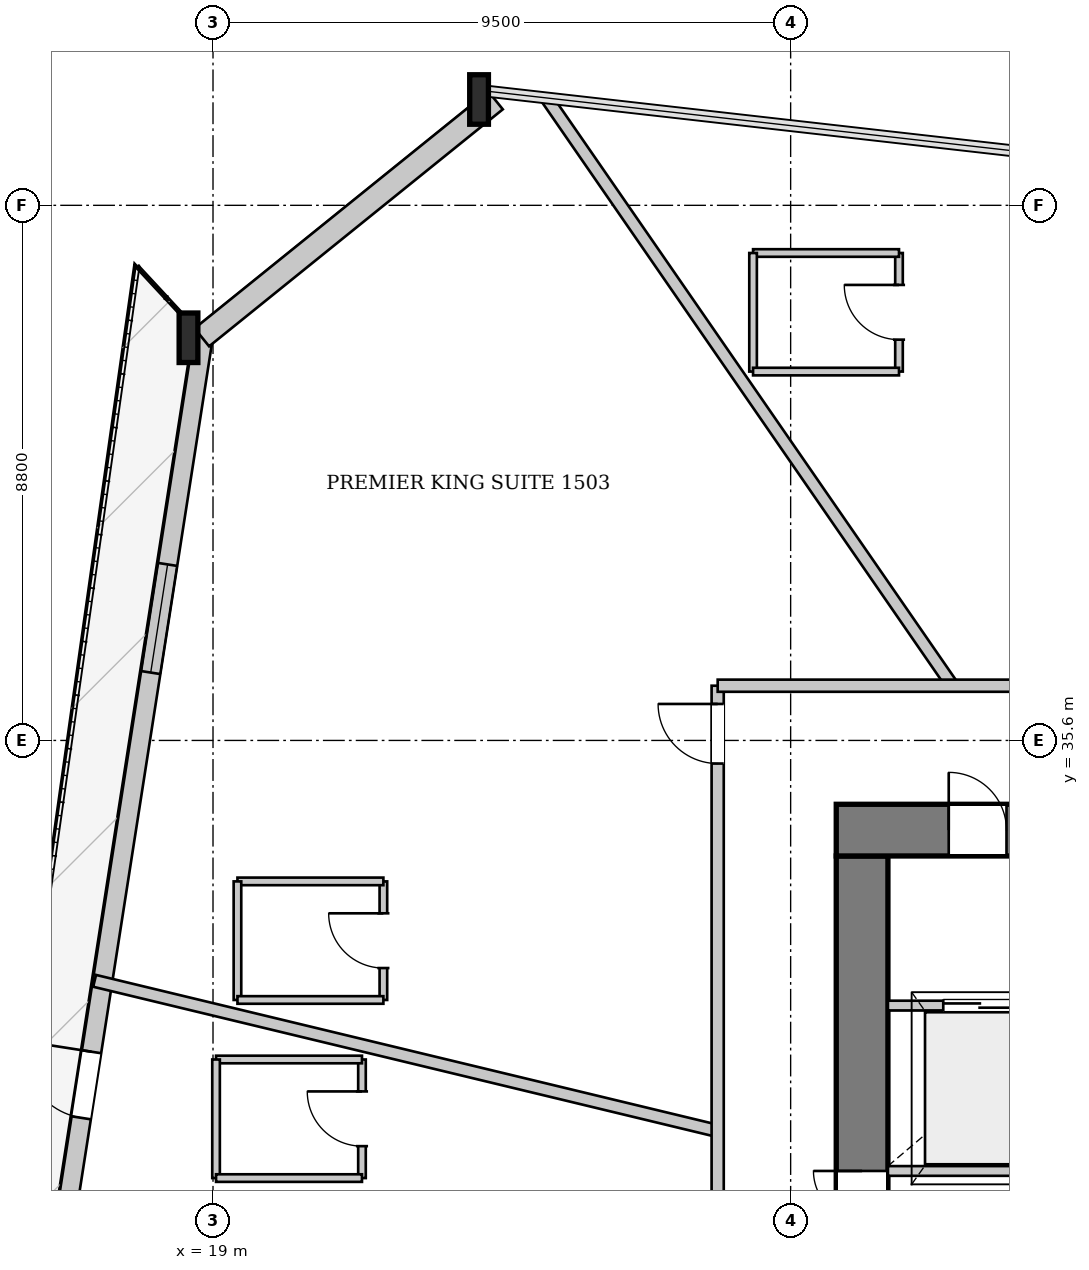
"""IFC4 building model, lengths in metres.
Left out: names, types, materials, properties, quantities, classifications, styles, units other than length and angle.
Written with IfcOpenShell. Run it as: python <this file> out.ifc"""

import sys

from ifc_helpers import new_model, si_unit, direction, frame, frame_2d, origin, origin_2d, place, context, subcontext, project, spatial, rectangle, i_section, extrude, source, transform, mapped, element, fill, save


model = new_model("IFC4")
c1 = context("Model", 3, precision=1e-05, world=origin(), true_north=direction((0.0, 1.0)))
c2 = subcontext(c1, "Body", "Model", "MODEL_VIEW")
j1 = project(units=[si_unit("LENGTHUNIT", "METRE"), si_unit("PLANEANGLEUNIT", "RADIAN")], contexts=[c1])
p1 = place(None, origin())
s1 = spatial("IfcSite", under=j1, at=p1, CompositionType="ELEMENT")
p2 = place(p1, origin())
s2 = spatial("IfcBuilding", under=s1, at=p2, CompositionType="ELEMENT")
p3 = place(p2, frame((0.0, 0.0, 61.25)))
s3 = spatial("IfcBuildingStorey", under=s2, at=p3, CompositionType="ELEMENT", Elevation=61.25)
m1 = source(origin(), c2, "Body", "SweptSolid", [
    extrude(i_section(OverallWidth=0.308, OverallDepth=0.814, WebThickness=0.021, FlangeThickness=0.04, at=origin_2d()), origin(), (0.0, 0.0, 1.0), 3.409),
])
p4 = place(p3, frame((23.527, 46.274, 0.0), z_axis=(-0.088944570663, -0.078632156673, 0.99292791646), x_axis=(0.662339568737, -0.749203774473, 0.0)))
e1 = element("IfcColumn", 1, at=p4, inside=s3, PredefinedType="COLUMN", context=c2, shape_type="MappedRepresentation", body=[
    mapped(m1, transform((0.0, 0.0, 0.0), x_axis=(1.0, 0.0, 0.0), y_axis=(0.0, 1.0, 0.0), z_axis=(0.0, 0.0, 1.0), scale=1.0)),
])
m2 = source(origin(), c2, "Body", "SweptSolid", [
    extrude(i_section(OverallWidth=0.308, OverallDepth=0.814, WebThickness=0.021, FlangeThickness=0.04, at=origin_2d()), origin(), (0.0, 0.0, 1.0), 3.405),
])
p5 = place(p3, frame((18.697, 42.377, 0.0), z_axis=(-0.058937346962, -0.090843818249, 0.994119605389), x_axis=(0.838912262551, -0.544266677045, 0.0)))
e2 = element("IfcColumn", 2, at=p5, inside=s3, PredefinedType="COLUMN", context=c2, shape_type="MappedRepresentation", body=[
    mapped(m2, transform((0.0, 0.0, 0.0), x_axis=(1.0, 0.0, 0.0), y_axis=(0.0, 1.0, 0.0), z_axis=(0.0, 0.0, 1.0), scale=1.0)),
])
p6 = place(p3, frame((16.006, 24.095, 0.0), z_axis=(0.0, 0.0, 1.0), x_axis=(0.154230167558, 0.988034946454, 0.0)))
e3 = element("IfcWall", 3, at=p6, inside=s3, PredefinedType="SOLIDWALL", context=c2, shape_type="SweptSolid", body=[
    extrude(rectangle(XDim=18.478, YDim=0.32, at=frame_2d((9.239, 0.0))), origin(), (0.0, 0.0, 1.0), 2.592),
])
p7 = place(p6, frame((5.363, 0.0, 0.0)))
e4 = element("IfcOpeningElement", 4, at=p7, cuts=e3, PredefinedType="OPENING", context=c2, shape_type="SweptSolid", body=[
    extrude(rectangle(XDim=1.1, YDim=2.3, at=frame_2d((0.55, 1.15))), frame((0.0, 0.17, 0.0), z_axis=(0.0, -1.0, 0.0), x_axis=(1.0, 0.0, 0.0)), (0.0, 0.0, 1.0), 0.34),
])
p8 = place(p6, frame((12.774, 0.0, 0.272)))
e5 = element("IfcOpeningElement", 5, at=p8, cuts=e3, PredefinedType="OPENING", context=c2, shape_type="SweptSolid", body=[
    extrude(rectangle(XDim=1.8, YDim=2.2, at=frame_2d((0.9, 1.1))), frame((0.0, 0.17, 0.0), z_axis=(0.0, -1.0, 0.0), x_axis=(1.0, 0.0, 0.0)), (0.0, 0.0, 1.0), 0.34),
])
p9 = place(p3, frame((18.817, 42.229, 0.0), z_axis=(0.0, 0.0, 1.0), x_axis=(0.778217687349, 0.627994610722, 0.0)))
e6 = element("IfcWall", 6, at=p9, inside=s3, PredefinedType="SOLIDWALL", context=c2, shape_type="SweptSolid", body=[
    extrude(rectangle(XDim=6.207, YDim=0.38, at=frame_2d((3.103, 0.0))), origin(), (0.0, 0.0, 1.0), 2.592),
])
p10 = place(p3, frame((29.675, 19.5, 0.0), z_axis=(0.0, 0.0, 1.0), x_axis=(0.0, 1.0, 0.0)))
e7 = element("IfcWall", 7, at=p10, inside=s3, PredefinedType="SHEAR", context=c2, shape_type="SweptSolid", body=[
    extrude(rectangle(XDim=14.2, YDim=0.85, at=frame_2d((7.1, 0.0))), origin(), (0.0, 0.0, 1.0), 3.3),
])
p11 = place(p10, frame((7.42, 0.0, 0.0)))
e8 = element("IfcOpeningElement", 8, at=p11, cuts=e7, PredefinedType="OPENING", context=c2, shape_type="SweptSolid", body=[
    extrude(rectangle(XDim=1.6, YDim=2.2, at=frame_2d((0.8, 1.1))), frame((0.0, 0.435, 0.0), z_axis=(0.0, -1.0, 0.0), x_axis=(1.0, 0.0, 0.0)), (0.0, 0.0, 1.0), 0.87),
])
p12 = place(p3, frame((29.25, 34.125, 0.0), z_axis=(0.0, 0.0, 1.0), x_axis=(1.0, 0.0, 0.0)))
e9 = element("IfcWall", 9, at=p12, inside=s3, PredefinedType="SHEAR", context=c2, shape_type="SweptSolid", body=[
    extrude(rectangle(XDim=17.5, YDim=0.85, at=frame_2d((8.75, 0.0))), origin(), (0.0, 0.0, 1.0), 3.3),
])
p13 = place(p12, frame((1.85, 0.0, 0.0)))
e10 = element("IfcOpeningElement", 10, at=p13, cuts=e9, PredefinedType="OPENING", context=c2, shape_type="SweptSolid", body=[
    extrude(rectangle(XDim=0.95, YDim=2.1, at=frame_2d((0.475, 1.05))), frame((0.0, 0.435, 0.0), z_axis=(0.0, -1.0, 0.0), x_axis=(1.0, 0.0, 0.0)), (0.0, 0.0, 1.0), 0.87),
])
p14 = place(p12, frame((4.23, 0.0, 0.0)))
e11 = element("IfcOpeningElement", 11, at=p14, cuts=e9, PredefinedType="OPENING", context=c2, shape_type="SweptSolid", body=[
    extrude(rectangle(XDim=1.32, YDim=2.2, at=frame_2d((0.66, 1.1))), frame((0.0, 0.435, 0.0), z_axis=(0.0, -1.0, 0.0), x_axis=(1.0, 0.0, 0.0)), (0.0, 0.0, 1.0), 0.87),
])
p15 = place(p12, frame((15.3, 0.0, 0.0)))
e12 = element("IfcOpeningElement", 12, at=p15, cuts=e9, PredefinedType="OPENING", context=c2, shape_type="SweptSolid", body=[
    extrude(rectangle(XDim=0.95, YDim=2.1, at=frame_2d((0.475, 1.05))), frame((0.0, 0.435, 0.0), z_axis=(0.0, -1.0, 0.0), x_axis=(1.0, 0.0, 0.0)), (0.0, 0.0, 1.0), 0.87),
])
p16 = place(p3, frame((30.1, 28.52, 0.0), z_axis=(0.0, 0.0, 1.0), x_axis=(1.0, 0.0, 0.0)))
e13 = element("IfcWall", 13, at=p16, inside=s3, PredefinedType="PARTITIONING", context=c2, shape_type="SweptSolid", body=[
    extrude(rectangle(XDim=3.02, YDim=0.16, at=frame_2d((1.51, 0.0))), origin(), (0.0, 0.0, 1.0), 3.3),
])
p17 = place(p3, frame((30.1, 31.24, 0.0), z_axis=(0.0, 0.0, 1.0), x_axis=(1.0, 0.0, 0.0)))
e14 = element("IfcWall", 14, at=p17, inside=s3, PredefinedType="PARTITIONING", context=c2, shape_type="SweptSolid", body=[
    extrude(rectangle(XDim=3.02, YDim=0.16, at=frame_2d((1.51, 0.0))), origin(), (0.0, 0.0, 1.0), 3.3),
])
p18 = place(p17, frame((0.91, 0.0, 0.0)))
e15 = element("IfcOpeningElement", 15, at=p18, cuts=e14, PredefinedType="OPENING", context=c2, shape_type="SweptSolid", body=[
    extrude(rectangle(XDim=1.2, YDim=2.2, at=frame_2d((0.6, 1.1))), frame((0.0, 0.09, 0.0), z_axis=(0.0, -1.0, 0.0), x_axis=(1.0, 0.0, 0.0)), (0.0, 0.0, 1.0), 0.18),
])
p19 = place(p3, frame((31.161, 36.5, 0.0), z_axis=(0.0, 0.0, 1.0), x_axis=(-0.568362835672, 0.822778030229, 0.0)))
e16 = element("IfcWall", 16, at=p19, inside=s3, PredefinedType="PARTITIONING", context=c2, shape_type="SweptSolid", body=[
    extrude(rectangle(XDim=11.708, YDim=0.2, at=frame_2d((5.854, 0.0))), origin(), (0.0, 0.0, 1.0), 3.3),
])
p20 = place(p3, frame((27.3, 29.178, 0.0), z_axis=(0.0, 0.0, 1.0), x_axis=(-0.972184679764, 0.234215602453, 0.0)))
e17 = element("IfcWall", 17, at=p20, inside=s3, PredefinedType="PARTITIONING", context=c2, shape_type="SweptSolid", body=[
    extrude(rectangle(XDim=10.541, YDim=0.2, at=frame_2d((5.27, 0.0))), origin(), (0.0, 0.0, 1.0), 3.3),
])
p21 = place(p3, frame((30.282, 41.666, 0.0), z_axis=(0.0, 0.0, 1.0), x_axis=(0.0, 1.0, 0.0)))
e18 = element("IfcWall", 18, at=p21, inside=s3, PredefinedType="PARTITIONING", context=c2, shape_type="SweptSolid", body=[
    extrude(rectangle(XDim=1.95, YDim=0.125, at=frame_2d((0.975, 0.0))), origin(), (0.0, 0.0, 1.0), 3.3),
])
p22 = place(p21, frame((0.525, 0.0, 0.0)))
e19 = element("IfcOpeningElement", 19, at=p22, cuts=e18, PredefinedType="OPENING", context=c2, shape_type="SweptSolid", body=[
    extrude(rectangle(XDim=0.9, YDim=2.1, at=frame_2d((0.45, 1.05))), frame((0.0, 0.073, 0.0), z_axis=(0.0, -1.0, 0.0), x_axis=(1.0, 0.0, 0.0)), (0.0, 0.0, 1.0), 0.145),
])
p23 = place(p3, frame((30.282, 43.616, 0.0), z_axis=(0.0, 0.0, 1.0), x_axis=(-1.0, 0.0, 0.0)))
e20 = element("IfcWall", 20, at=p23, inside=s3, PredefinedType="PARTITIONING", context=c2, shape_type="SweptSolid", body=[
    extrude(rectangle(XDim=2.4, YDim=0.125, at=frame_2d((1.2, 0.0))), origin(), (0.0, 0.0, 1.0), 3.3),
])
p24 = place(p3, frame((27.882, 43.616, 0.0), z_axis=(0.0, 0.0, 1.0), x_axis=(0.0, -1.0, 0.0)))
e21 = element("IfcWall", 21, at=p24, inside=s3, PredefinedType="PARTITIONING", context=c2, shape_type="SweptSolid", body=[
    extrude(rectangle(XDim=1.95, YDim=0.125, at=frame_2d((0.975, 0.0))), origin(), (0.0, 0.0, 1.0), 3.3),
])
p25 = place(p3, frame((27.882, 41.666, 0.0), z_axis=(0.0, 0.0, 1.0), x_axis=(1.0, 0.0, 0.0)))
e22 = element("IfcWall", 22, at=p25, inside=s3, PredefinedType="PARTITIONING", context=c2, shape_type="SweptSolid", body=[
    extrude(rectangle(XDim=2.4, YDim=0.125, at=frame_2d((1.2, 0.0))), origin(), (0.0, 0.0, 1.0), 3.3),
])
p26 = place(p3, frame((21.802, 31.332, 0.0), z_axis=(0.0, 0.0, 1.0), x_axis=(0.0, 1.0, 0.0)))
e23 = element("IfcWall", 23, at=p26, inside=s3, PredefinedType="PARTITIONING", context=c2, shape_type="SweptSolid", body=[
    extrude(rectangle(XDim=1.95, YDim=0.125, at=frame_2d((0.975, 0.0))), origin(), (0.0, 0.0, 1.0), 3.3),
])
p27 = place(p26, frame((0.525, 0.0, 0.0)))
e24 = element("IfcOpeningElement", 24, at=p27, cuts=e23, PredefinedType="OPENING", context=c2, shape_type="SweptSolid", body=[
    extrude(rectangle(XDim=0.9, YDim=2.1, at=frame_2d((0.45, 1.05))), frame((0.0, 0.073, 0.0), z_axis=(0.0, -1.0, 0.0), x_axis=(1.0, 0.0, 0.0)), (0.0, 0.0, 1.0), 0.145),
])
p28 = place(p3, frame((21.802, 33.282, 0.0), z_axis=(0.0, 0.0, 1.0), x_axis=(-1.0, 0.0, 0.0)))
e25 = element("IfcWall", 25, at=p28, inside=s3, PredefinedType="PARTITIONING", context=c2, shape_type="SweptSolid", body=[
    extrude(rectangle(XDim=2.4, YDim=0.125, at=frame_2d((1.2, 0.0))), origin(), (0.0, 0.0, 1.0), 3.3),
])
p29 = place(p3, frame((19.402, 33.282, 0.0), z_axis=(0.0, 0.0, 1.0), x_axis=(0.0, -1.0, 0.0)))
e26 = element("IfcWall", 26, at=p29, inside=s3, PredefinedType="PARTITIONING", context=c2, shape_type="SweptSolid", body=[
    extrude(rectangle(XDim=1.95, YDim=0.125, at=frame_2d((0.975, 0.0))), origin(), (0.0, 0.0, 1.0), 3.3),
])
p30 = place(p3, frame((19.402, 31.332, 0.0), z_axis=(0.0, 0.0, 1.0), x_axis=(1.0, 0.0, 0.0)))
e27 = element("IfcWall", 27, at=p30, inside=s3, PredefinedType="PARTITIONING", context=c2, shape_type="SweptSolid", body=[
    extrude(rectangle(XDim=2.4, YDim=0.125, at=frame_2d((1.2, 0.0))), origin(), (0.0, 0.0, 1.0), 3.3),
])
p31 = place(p3, frame((21.45, 28.403, 0.0), z_axis=(0.0, 0.0, 1.0), x_axis=(0.0, 1.0, 0.0)))
e28 = element("IfcWall", 28, at=p31, inside=s3, PredefinedType="PARTITIONING", context=c2, shape_type="SweptSolid", body=[
    extrude(rectangle(XDim=1.95, YDim=0.125, at=frame_2d((0.975, 0.0))), origin(), (0.0, 0.0, 1.0), 3.3),
])
p32 = place(p31, frame((0.525, 0.0, 0.0)))
e29 = element("IfcOpeningElement", 29, at=p32, cuts=e28, PredefinedType="OPENING", context=c2, shape_type="SweptSolid", body=[
    extrude(rectangle(XDim=0.9, YDim=2.1, at=frame_2d((0.45, 1.05))), frame((0.0, 0.073, 0.0), z_axis=(0.0, -1.0, 0.0), x_axis=(1.0, 0.0, 0.0)), (0.0, 0.0, 1.0), 0.145),
])
p33 = place(p3, frame((21.45, 30.353, 0.0), z_axis=(0.0, 0.0, 1.0), x_axis=(-1.0, 0.0, 0.0)))
e30 = element("IfcWall", 30, at=p33, inside=s3, PredefinedType="PARTITIONING", context=c2, shape_type="SweptSolid", body=[
    extrude(rectangle(XDim=2.4, YDim=0.125, at=frame_2d((1.2, 0.0))), origin(), (0.0, 0.0, 1.0), 3.3),
])
p34 = place(p3, frame((19.05, 30.353, 0.0), z_axis=(0.0, 0.0, 1.0), x_axis=(0.0, -1.0, 0.0)))
e31 = element("IfcWall", 31, at=p34, inside=s3, PredefinedType="PARTITIONING", context=c2, shape_type="SweptSolid", body=[
    extrude(rectangle(XDim=1.95, YDim=0.125, at=frame_2d((0.975, 0.0))), origin(), (0.0, 0.0, 1.0), 3.3),
])
p35 = place(p3, frame((19.05, 28.403, 0.0), z_axis=(0.0, 0.0, 1.0), x_axis=(1.0, 0.0, 0.0)))
e32 = element("IfcWall", 32, at=p35, inside=s3, PredefinedType="PARTITIONING", context=c2, shape_type="SweptSolid", body=[
    extrude(rectangle(XDim=2.4, YDim=0.125, at=frame_2d((1.2, 0.0))), origin(), (0.0, 0.0, 1.0), 3.3),
])
p36 = place(p3, frame((27.3, 16.7, 0.0), z_axis=(0.0, 0.0, 1.0), x_axis=(0.0, 1.0, 0.0)))
e33 = element("IfcWall", 33, at=p36, inside=s3, PredefinedType="PARTITIONING", context=c2, shape_type="SweptSolid", body=[
    extrude(rectangle(XDim=19.8, YDim=0.2, at=frame_2d((9.9, 0.0))), origin(), (0.0, 0.0, 1.0), 3.3),
])
p37 = place(p36, frame((18.52, 0.0, 0.0)))
e34 = element("IfcOpeningElement", 34, at=p37, cuts=e33, PredefinedType="OPENING", context=c2, shape_type="SweptSolid", body=[
    extrude(rectangle(XDim=0.98, YDim=2.15, at=frame_2d((0.49, 1.075))), frame((0.0, 0.11, 0.0), z_axis=(0.0, -1.0, 0.0), x_axis=(1.0, 0.0, 0.0)), (0.0, 0.0, 1.0), 0.22),
])
p38 = place(p36, frame((9.047, 0.0, 0.0)))
e35 = element("IfcOpeningElement", 35, at=p38, cuts=e33, PredefinedType="OPENING", context=c2, shape_type="SweptSolid", body=[
    extrude(rectangle(XDim=0.98, YDim=2.15, at=frame_2d((0.49, 1.075))), frame((0.0, 0.11, 0.0), z_axis=(0.0, -1.0, 0.0), x_axis=(1.0, 0.0, 0.0)), (0.0, 0.0, 1.0), 0.22),
])
p39 = place(p36, frame((0.3, 0.0, 0.0)))
e36 = element("IfcOpeningElement", 36, at=p39, cuts=e33, PredefinedType="OPENING", context=c2, shape_type="SweptSolid", body=[
    extrude(rectangle(XDim=0.98, YDim=2.15, at=frame_2d((0.49, 1.075))), frame((0.0, 0.11, 0.0), z_axis=(0.0, -1.0, 0.0), x_axis=(1.0, 0.0, 0.0)), (0.0, 0.0, 1.0), 0.22),
])
p40 = place(p3, frame((27.3, 36.5, 0.0), z_axis=(0.0, 0.0, 1.0), x_axis=(1.0, 0.0, 0.0)))
e37 = element("IfcWall", 37, at=p40, inside=s3, PredefinedType="PARTITIONING", context=c2, shape_type="SweptSolid", body=[
    extrude(rectangle(XDim=21.4, YDim=0.2, at=frame_2d((10.7, 0.0))), origin(), (0.0, 0.0, 1.0), 3.3),
])
p41 = place(p40, frame((19.414, 0.0, 0.0)))
e38 = element("IfcOpeningElement", 38, at=p41, cuts=e37, PredefinedType="OPENING", context=c2, shape_type="SweptSolid", body=[
    extrude(rectangle(XDim=0.98, YDim=2.15, at=frame_2d((0.49, 1.075))), frame((0.0, 0.11, 0.0), z_axis=(0.0, -1.0, 0.0), x_axis=(1.0, 0.0, 0.0)), (0.0, 0.0, 1.0), 0.22),
])
p42 = place(p40, frame((6.682, 0.0, 0.0)))
e39 = element("IfcOpeningElement", 39, at=p42, cuts=e37, PredefinedType="OPENING", context=c2, shape_type="SweptSolid", body=[
    extrude(rectangle(XDim=0.98, YDim=2.15, at=frame_2d((0.49, 1.075))), frame((0.0, 0.11, 0.0), z_axis=(0.0, -1.0, 0.0), x_axis=(1.0, 0.0, 0.0)), (0.0, 0.0, 1.0), 0.22),
])
m3 = source(origin(), c2, "Body", "SweptSolid", [
    extrude(rectangle(XDim=1.1, YDim=2.3, at=frame_2d((0.55, 1.15))), frame((0.0, 0.025, 0.0), z_axis=(0.0, -1.0, 0.0), x_axis=(1.0, 0.0, 0.0)), (0.0, 0.0, 1.0), 0.05),
])
p43 = place(p7, origin())
e40 = element("IfcDoor", 40, at=p43, inside=s3, OperationType="SINGLE_SWING_RIGHT", PredefinedType="DOOR", context=c2, shape_type="MappedRepresentation", body=[
    mapped(m3, transform((0.0, 0.0, 0.0), x_axis=(1.0, 0.0, 0.0), y_axis=(0.0, 1.0, 0.0), z_axis=(0.0, 0.0, 1.0), scale=1.0)),
])
fill(e4, e40)
m4 = source(origin(), c2, "Body", "SweptSolid", [
    extrude(rectangle(XDim=1.8, YDim=2.2, at=frame_2d((0.9, 1.1))), frame((0.0, 0.03, 0.0), z_axis=(0.0, -1.0, 0.0), x_axis=(1.0, 0.0, 0.0)), (0.0, 0.0, 1.0), 0.06),
])
p44 = place(p8, origin())
e41 = element("IfcWindow", 41, at=p44, inside=s3, PartitioningType="SINGLE_PANEL", PredefinedType="WINDOW", context=c2, shape_type="MappedRepresentation", body=[
    mapped(m4, transform((0.0, 0.0, 0.0), x_axis=(1.0, 0.0, 0.0), y_axis=(0.0, 1.0, 0.0), z_axis=(0.0, 0.0, 1.0), scale=1.0)),
])
fill(e5, e41)
m5 = source(origin(), c2, "Body", "SweptSolid", [
    extrude(rectangle(XDim=1.6, YDim=2.2, at=frame_2d((0.8, 1.1))), frame((0.0, 0.025, 0.0), z_axis=(0.0, -1.0, 0.0), x_axis=(1.0, 0.0, 0.0)), (0.0, 0.0, 1.0), 0.05),
])
p45 = place(p11, origin())
e42 = element("IfcDoor", 42, at=p45, inside=s3, OperationType="DOUBLE_DOOR_SINGLE_SWING", PredefinedType="DOOR", context=c2, shape_type="MappedRepresentation", body=[
    mapped(m5, transform((0.0, 0.0, 0.0), x_axis=(1.0, 0.0, 0.0), y_axis=(0.0, 1.0, 0.0), z_axis=(0.0, 0.0, 1.0), scale=1.0)),
])
fill(e8, e42)
m6 = source(origin(), c2, "Body", "SweptSolid", [
    extrude(rectangle(XDim=0.95, YDim=2.1, at=frame_2d((0.475, 1.05))), frame((0.0, 0.025, 0.0), z_axis=(0.0, -1.0, 0.0), x_axis=(1.0, 0.0, 0.0)), (0.0, 0.0, 1.0), 0.05),
])
p46 = place(p13, origin())
e43 = element("IfcDoor", 43, at=p46, inside=s3, OperationType="SINGLE_SWING_LEFT", PredefinedType="DOOR", context=c2, shape_type="MappedRepresentation", body=[
    mapped(m6, transform((0.0, 0.0, 0.0), x_axis=(1.0, 0.0, 0.0), y_axis=(0.0, 1.0, 0.0), z_axis=(0.0, 0.0, 1.0), scale=1.0)),
])
fill(e10, e43)
m7 = source(origin(), c2, "Body", "SweptSolid", [
    extrude(rectangle(XDim=1.2, YDim=2.2, at=frame_2d((0.6, 1.1))), frame((0.0, 0.025, 0.0), z_axis=(0.0, -1.0, 0.0), x_axis=(1.0, 0.0, 0.0)), (0.0, 0.0, 1.0), 0.05),
])
p47 = place(p18, origin())
e44 = element("IfcDoor", 44, at=p47, inside=s3, OperationType="DOUBLE_DOOR_SLIDING", PredefinedType="DOOR", context=c2, shape_type="MappedRepresentation", body=[
    mapped(m7, transform((0.0, 0.0, 0.0), x_axis=(1.0, 0.0, 0.0), y_axis=(0.0, 1.0, 0.0), z_axis=(0.0, 0.0, 1.0), scale=1.0)),
])
fill(e15, e44)
m8 = source(origin(), c2, "Body", "SweptSolid", [
    extrude(rectangle(XDim=0.9, YDim=2.1, at=frame_2d((0.45, 1.05))), frame((0.0, 0.025, 0.0), z_axis=(0.0, -1.0, 0.0), x_axis=(1.0, 0.0, 0.0)), (0.0, 0.0, 1.0), 0.05),
])
p48 = place(p22, origin())
e45 = element("IfcDoor", 45, at=p48, inside=s3, OperationType="SINGLE_SWING_RIGHT", PredefinedType="DOOR", context=c2, shape_type="MappedRepresentation", body=[
    mapped(m8, transform((0.0, 0.0, 0.0), x_axis=(1.0, 0.0, 0.0), y_axis=(0.0, 1.0, 0.0), z_axis=(0.0, 0.0, 1.0), scale=1.0)),
])
fill(e19, e45)
p49 = place(p27, origin())
e46 = element("IfcDoor", 46, at=p49, inside=s3, OperationType="SINGLE_SWING_RIGHT", PredefinedType="DOOR", context=c2, shape_type="MappedRepresentation", body=[
    mapped(m8, transform((0.0, 0.0, 0.0), x_axis=(1.0, 0.0, 0.0), y_axis=(0.0, 1.0, 0.0), z_axis=(0.0, 0.0, 1.0), scale=1.0)),
])
fill(e24, e46)
p50 = place(p32, origin())
e47 = element("IfcDoor", 47, at=p50, inside=s3, OperationType="SINGLE_SWING_RIGHT", PredefinedType="DOOR", context=c2, shape_type="MappedRepresentation", body=[
    mapped(m8, transform((0.0, 0.0, 0.0), x_axis=(1.0, 0.0, 0.0), y_axis=(0.0, 1.0, 0.0), z_axis=(0.0, 0.0, 1.0), scale=1.0)),
])
fill(e29, e47)
m9 = source(origin(), c2, "Body", "SweptSolid", [
    extrude(rectangle(XDim=0.98, YDim=2.15, at=frame_2d((0.49, 1.075))), frame((0.0, 0.025, 0.0), z_axis=(0.0, -1.0, 0.0), x_axis=(1.0, 0.0, 0.0)), (0.0, 0.0, 1.0), 0.05),
])
p51 = place(p37, origin())
e48 = element("IfcDoor", 48, at=p51, inside=s3, OperationType="SINGLE_SWING_RIGHT", PredefinedType="DOOR", context=c2, shape_type="MappedRepresentation", body=[
    mapped(m9, transform((0.0, 0.0, 0.0), x_axis=(1.0, 0.0, 0.0), y_axis=(0.0, 1.0, 0.0), z_axis=(0.0, 0.0, 1.0), scale=1.0)),
])
fill(e34, e48)
save(model, sys.argv[1])
